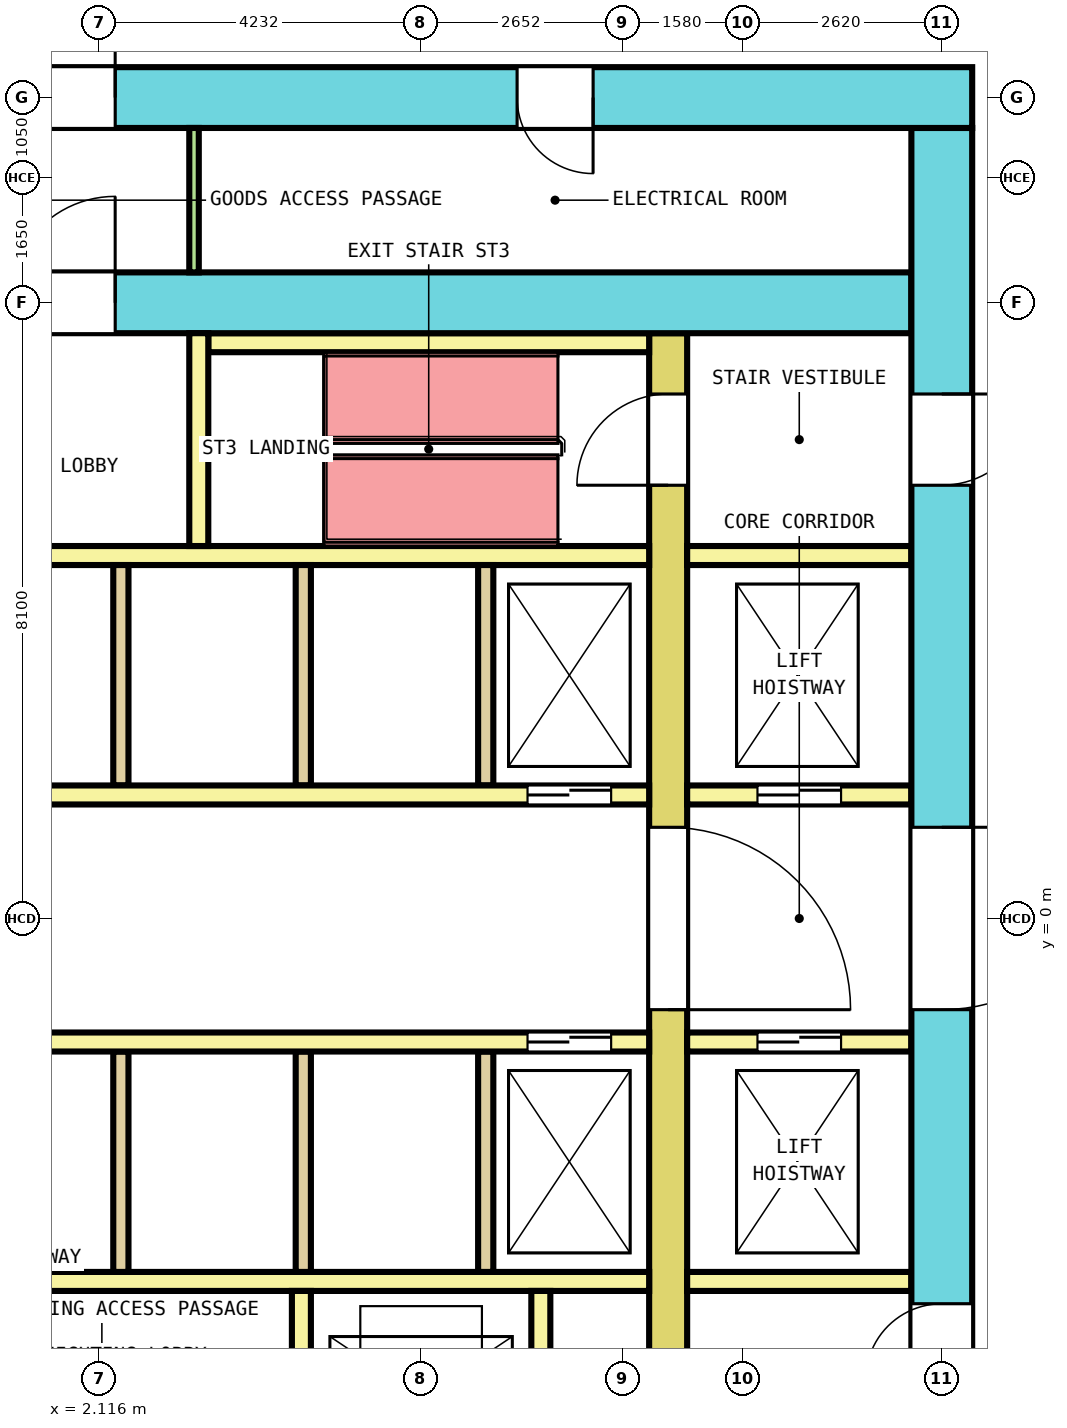
"""IFC4 building model, lengths in metres.
Left out: names, types, materials, properties, quantities, classifications, styles, units other than length and angle.
Written with IfcOpenShell. Run it as: python <this file> out.ifc"""

import sys

from ifc_helpers import new_model, si_unit, direction, frame, frame_2d, origin, place, context, subcontext, project, spatial, rectangle, extrude, element, fill, save


model = new_model("IFC4")
c1 = context("Model", 3, precision=1e-05, world=origin(), true_north=direction((0.0, 1.0)))
c2 = subcontext(c1, "Body", "Model", "MODEL_VIEW")
j1 = project(units=[si_unit("LENGTHUNIT", "METRE"), si_unit("PLANEANGLEUNIT", "RADIAN")], contexts=[c1])
p1 = place(None, origin())
s1 = spatial("IfcSite", under=j1, at=p1, CompositionType="ELEMENT")
p2 = place(p1, origin())
s2 = spatial("IfcBuilding", under=s1, at=p2, CompositionType="ELEMENT")
p3 = place(p2, frame((0.0, 0.0, 89.6)))
s3 = spatial("IfcBuildingStorey", under=s2, at=p3, CompositionType="ELEMENT", Elevation=89.6)
p4 = place(p3, frame((-13.6, 10.8, 0.0), z_axis=(0.0, 0.0, 1.0), x_axis=(1.0, 0.0, 0.0)))
e1 = element("IfcWall", 1, at=p4, inside=s3, PredefinedType="SHEAR", context=c2, shape_type="SweptSolid", body=[
    extrude(rectangle(XDim=27.2, YDim=0.8, at=frame_2d((13.6, 0.0))), origin(), (0.0, 0.0, 1.0), 4.1),
])
p5 = place(p4, frame((1.798, 0.0, 0.0)))
e2 = element("IfcOpeningElement", 2, at=p5, cuts=e1, PredefinedType="OPENING", context=c2, shape_type="SweptSolid", body=[
    extrude(rectangle(XDim=1.0, YDim=2.1, at=frame_2d((0.5, 1.05))), frame((0.0, 0.41, 0.0), z_axis=(0.0, -1.0, 0.0), x_axis=(1.0, 0.0, 0.0)), (0.0, 0.0, 1.0), 0.82),
])
p6 = place(p4, frame((4.889, 0.0, 0.0)))
e3 = element("IfcOpeningElement", 3, at=p6, cuts=e1, PredefinedType="OPENING", context=c2, shape_type="SweptSolid", body=[
    extrude(rectangle(XDim=1.0, YDim=2.1, at=frame_2d((0.5, 1.05))), frame((0.0, 0.41, 0.0), z_axis=(0.0, -1.0, 0.0), x_axis=(1.0, 0.0, 0.0)), (0.0, 0.0, 1.0), 0.82),
])
p7 = place(p4, frame((7.948, 0.0, 0.0)))
e4 = element("IfcOpeningElement", 4, at=p7, cuts=e1, PredefinedType="OPENING", context=c2, shape_type="SweptSolid", body=[
    extrude(rectangle(XDim=1.0, YDim=2.1, at=frame_2d((0.5, 1.05))), frame((0.0, 0.41, 0.0), z_axis=(0.0, -1.0, 0.0), x_axis=(1.0, 0.0, 0.0)), (0.0, 0.0, 1.0), 0.82),
])
p8 = place(p4, frame((11.008, 0.0, 0.0)))
e5 = element("IfcOpeningElement", 5, at=p8, cuts=e1, PredefinedType="OPENING", context=c2, shape_type="SweptSolid", body=[
    extrude(rectangle(XDim=1.0, YDim=2.1, at=frame_2d((0.5, 1.05))), frame((0.0, 0.41, 0.0), z_axis=(0.0, -1.0, 0.0), x_axis=(1.0, 0.0, 0.0)), (0.0, 0.0, 1.0), 0.82),
])
p9 = place(p4, frame((21.212, 0.0, 0.0)))
e6 = element("IfcOpeningElement", 6, at=p9, cuts=e1, PredefinedType="OPENING", context=c2, shape_type="SweptSolid", body=[
    extrude(rectangle(XDim=1.0, YDim=2.1, at=frame_2d((0.5, 1.05))), frame((0.0, 0.41, 0.0), z_axis=(0.0, -1.0, 0.0), x_axis=(1.0, 0.0, 0.0)), (0.0, 0.0, 1.0), 0.82),
])
p10 = place(p4, frame((14.525, 0.0, 0.0)))
e7 = element("IfcOpeningElement", 7, at=p10, cuts=e1, PredefinedType="OPENING", context=c2, shape_type="SweptSolid", body=[
    extrude(rectangle(XDim=1.4, YDim=2.1, at=frame_2d((0.7, 1.05))), frame((0.0, 0.41, 0.0), z_axis=(0.0, -1.0, 0.0), x_axis=(1.0, 0.0, 0.0)), (0.0, 0.0, 1.0), 0.82),
])
p11 = place(p3, frame((13.2, -10.4, 0.0), z_axis=(0.0, 0.0, 1.0), x_axis=(0.0, 1.0, 0.0)))
e8 = element("IfcWall", 8, at=p11, inside=s3, PredefinedType="SHEAR", context=c2, shape_type="SweptSolid", body=[
    extrude(rectangle(XDim=20.8, YDim=0.8, at=frame_2d((10.4, 0.0))), origin(), (0.0, 0.0, 1.0), 4.1),
])
p12 = place(p11, frame((9.2, 0.0, 0.0)))
e9 = element("IfcOpeningElement", 9, at=p12, cuts=e8, PredefinedType="OPENING", context=c2, shape_type="SweptSolid", body=[
    extrude(rectangle(XDim=2.4, YDim=2.1, at=frame_2d((1.2, 1.05))), frame((0.0, 0.41, 0.0), z_axis=(0.0, -1.0, 0.0), x_axis=(1.0, 0.0, 0.0)), (0.0, 0.0, 1.0), 0.82),
])
p13 = place(p11, frame((16.1, 0.0, 0.0)))
e10 = element("IfcOpeningElement", 10, at=p13, cuts=e8, PredefinedType="OPENING", context=c2, shape_type="SweptSolid", body=[
    extrude(rectangle(XDim=1.2, YDim=2.1, at=frame_2d((0.6, 1.05))), frame((0.0, 0.41, 0.0), z_axis=(0.0, -1.0, 0.0), x_axis=(1.0, 0.0, 0.0)), (0.0, 0.0, 1.0), 0.82),
])
p14 = place(p11, frame((2.869, 0.0, 0.0)))
e11 = element("IfcOpeningElement", 11, at=p14, cuts=e8, PredefinedType="OPENING", context=c2, shape_type="SweptSolid", body=[
    extrude(rectangle(XDim=1.0, YDim=2.1, at=frame_2d((0.5, 1.05))), frame((0.0, 0.41, 0.0), z_axis=(0.0, -1.0, 0.0), x_axis=(1.0, 0.0, 0.0)), (0.0, 0.0, 1.0), 0.82),
])
p15 = place(p11, frame((4.331, 0.0, 0.0)))
e12 = element("IfcOpeningElement", 12, at=p15, cuts=e8, PredefinedType="OPENING", context=c2, shape_type="SweptSolid", body=[
    extrude(rectangle(XDim=1.0, YDim=2.1, at=frame_2d((0.5, 1.05))), frame((0.0, 0.41, 0.0), z_axis=(0.0, -1.0, 0.0), x_axis=(1.0, 0.0, 0.0)), (0.0, 0.0, 1.0), 0.82),
])
p16 = place(p3, frame((-12.8, 8.1, 0.0), z_axis=(0.0, 0.0, 1.0), x_axis=(1.0, 0.0, 0.0)))
e13 = element("IfcWall", 13, at=p16, inside=s3, PredefinedType="SHEAR", context=c2, shape_type="SweptSolid", body=[
    extrude(rectangle(XDim=25.6, YDim=0.8, at=frame_2d((12.8, 0.0))), origin(), (0.0, 0.0, 1.0), 4.1),
])
p17 = place(p16, frame((13.725, 0.0, 0.0)))
e14 = element("IfcOpeningElement", 14, at=p17, cuts=e13, PredefinedType="OPENING", context=c2, shape_type="SweptSolid", body=[
    extrude(rectangle(XDim=1.4, YDim=2.1, at=frame_2d((0.7, 1.05))), frame((0.0, 0.41, 0.0), z_axis=(0.0, -1.0, 0.0), x_axis=(1.0, 0.0, 0.0)), (0.0, 0.0, 1.0), 0.82),
])
p18 = place(p3, frame((9.6, -7.7, 0.0), z_axis=(0.0, 0.0, 1.0), x_axis=(0.0, 1.0, 0.0)))
e15 = element("IfcWall", 15, at=p18, inside=s3, PredefinedType="SHEAR", context=c2, shape_type="SweptSolid", body=[
    extrude(rectangle(XDim=15.4, YDim=0.5, at=frame_2d((7.7, 0.0))), origin(), (0.0, 0.0, 1.0), 4.1),
])
p19 = place(p18, frame((6.5, 0.0, 0.0)))
e16 = element("IfcOpeningElement", 16, at=p19, cuts=e15, PredefinedType="OPENING", context=c2, shape_type="SweptSolid", body=[
    extrude(rectangle(XDim=2.4, YDim=2.1, at=frame_2d((1.2, 1.05))), frame((0.0, 0.26, 0.0), z_axis=(0.0, -1.0, 0.0), x_axis=(1.0, 0.0, 0.0)), (0.0, 0.0, 1.0), 0.52),
])
p20 = place(p18, frame((13.4, 0.0, 0.0)))
e17 = element("IfcOpeningElement", 17, at=p20, cuts=e15, PredefinedType="OPENING", context=c2, shape_type="SweptSolid", body=[
    extrude(rectangle(XDim=1.2, YDim=2.1, at=frame_2d((0.6, 1.05))), frame((0.0, 0.26, 0.0), z_axis=(0.0, -1.0, 0.0), x_axis=(1.0, 0.0, 0.0)), (0.0, 0.0, 1.0), 0.52),
])
p21 = place(p18, frame((0.9, 0.0, 0.0)))
e18 = element("IfcOpeningElement", 18, at=p21, cuts=e15, PredefinedType="OPENING", context=c2, shape_type="SweptSolid", body=[
    extrude(rectangle(XDim=1.0, YDim=2.1, at=frame_2d((0.5, 1.05))), frame((0.0, 0.26, 0.0), z_axis=(0.0, -1.0, 0.0), x_axis=(1.0, 0.0, 0.0)), (0.0, 0.0, 1.0), 0.52),
])
p22 = place(p3, frame((-9.35, 1.625, 0.0), z_axis=(0.0, 0.0, 1.0), x_axis=(1.0, 0.0, 0.0)))
e19 = element("IfcWall", 19, at=p22, inside=s3, PredefinedType="SOLIDWALL", context=c2, shape_type="SweptSolid", body=[
    extrude(rectangle(XDim=18.7, YDim=0.25, at=frame_2d((9.35, 0.0))), origin(), (0.0, 0.0, 1.0), 4.1),
])
p23 = place(p22, frame((0.5, 0.0, 0.0)))
e20 = element("IfcOpeningElement", 20, at=p23, cuts=e19, PredefinedType="OPENING", context=c2, shape_type="SweptSolid", body=[
    extrude(rectangle(XDim=1.1, YDim=2.1, at=frame_2d((0.55, 1.05))), frame((0.0, 0.135, 0.0), z_axis=(0.0, -1.0, 0.0), x_axis=(1.0, 0.0, 0.0)), (0.0, 0.0, 1.0), 0.27),
])
p24 = place(p22, frame((17.1, 0.0, 0.0)))
e21 = element("IfcOpeningElement", 21, at=p24, cuts=e19, PredefinedType="OPENING", context=c2, shape_type="SweptSolid", body=[
    extrude(rectangle(XDim=1.1, YDim=2.1, at=frame_2d((0.55, 1.05))), frame((0.0, 0.135, 0.0), z_axis=(0.0, -1.0, 0.0), x_axis=(1.0, 0.0, 0.0)), (0.0, 0.0, 1.0), 0.27),
])
p25 = place(p3, frame((9.85, 1.625, 0.0), z_axis=(0.0, 0.0, 1.0), x_axis=(1.0, 0.0, 0.0)))
e22 = element("IfcWall", 22, at=p25, inside=s3, PredefinedType="SOLIDWALL", context=c2, shape_type="SweptSolid", body=[
    extrude(rectangle(XDim=2.95, YDim=0.25, at=frame_2d((1.475, 0.0))), origin(), (0.0, 0.0, 1.0), 4.1),
])
p26 = place(p25, frame((0.925, 0.0, 0.0)))
e23 = element("IfcOpeningElement", 23, at=p26, cuts=e22, PredefinedType="OPENING", context=c2, shape_type="SweptSolid", body=[
    extrude(rectangle(XDim=1.1, YDim=2.1, at=frame_2d((0.55, 1.05))), frame((0.0, 0.135, 0.0), z_axis=(0.0, -1.0, 0.0), x_axis=(1.0, 0.0, 0.0)), (0.0, 0.0, 1.0), 0.27),
])
p27 = place(p3, frame((-9.35, 4.775, 0.0), z_axis=(0.0, 0.0, 1.0), x_axis=(1.0, 0.0, 0.0)))
e24 = element("IfcWall", 24, at=p27, inside=s3, PredefinedType="SOLIDWALL", context=c2, shape_type="SweptSolid", body=[
    extrude(rectangle(XDim=18.7, YDim=0.25, at=frame_2d((9.35, 0.0))), origin(), (0.0, 0.0, 1.0), 4.1),
])
p28 = place(p3, frame((9.85, 4.775, 0.0), z_axis=(0.0, 0.0, 1.0), x_axis=(1.0, 0.0, 0.0)))
e25 = element("IfcWall", 25, at=p28, inside=s3, PredefinedType="SOLIDWALL", context=c2, shape_type="SweptSolid", body=[
    extrude(rectangle(XDim=2.95, YDim=0.25, at=frame_2d((1.475, 0.0))), origin(), (0.0, 0.0, 1.0), 4.1),
])
for number, where, z_axis, x_axis in (
    (26, (2.4, 1.75, 0.0), (0.0, 0.0, 1.0), (0.0, 1.0, 0.0)),
    (27, (4.8, 1.75, 0.0), (0.0, 0.0, 1.0), (0.0, 1.0, 0.0)),
    (28, (7.2, 1.75, 0.0), (0.0, 0.0, 1.0), (0.0, 1.0, 0.0)),
):
    element("IfcWall", number, at=place(p3, frame(where, z_axis=z_axis, x_axis=x_axis)), inside=s3, PredefinedType="SOLIDWALL", context=c2, shape_type="SweptSolid", body=[
        extrude(rectangle(XDim=2.9, YDim=0.2, at=frame_2d((1.45, 0.0))), origin(), (0.0, 0.0, 1.0), 4.1),
    ])
p29 = place(p3, frame((-9.35, -1.625, 0.0), z_axis=(0.0, 0.0, 1.0), x_axis=(1.0, 0.0, 0.0)))
e29 = element("IfcWall", 29, at=p29, inside=s3, PredefinedType="SOLIDWALL", context=c2, shape_type="SweptSolid", body=[
    extrude(rectangle(XDim=18.7, YDim=0.25, at=frame_2d((9.35, 0.0))), origin(), (0.0, 0.0, 1.0), 4.1),
])
p30 = place(p29, frame((0.5, 0.0, 0.0)))
e30 = element("IfcOpeningElement", 30, at=p30, cuts=e29, PredefinedType="OPENING", context=c2, shape_type="SweptSolid", body=[
    extrude(rectangle(XDim=1.1, YDim=2.1, at=frame_2d((0.55, 1.05))), frame((0.0, 0.135, 0.0), z_axis=(0.0, -1.0, 0.0), x_axis=(1.0, 0.0, 0.0)), (0.0, 0.0, 1.0), 0.27),
])
p31 = place(p29, frame((17.1, 0.0, 0.0)))
e31 = element("IfcOpeningElement", 31, at=p31, cuts=e29, PredefinedType="OPENING", context=c2, shape_type="SweptSolid", body=[
    extrude(rectangle(XDim=1.1, YDim=2.1, at=frame_2d((0.55, 1.05))), frame((0.0, 0.135, 0.0), z_axis=(0.0, -1.0, 0.0), x_axis=(1.0, 0.0, 0.0)), (0.0, 0.0, 1.0), 0.27),
])
p32 = place(p3, frame((9.85, -1.625, 0.0), z_axis=(0.0, 0.0, 1.0), x_axis=(1.0, 0.0, 0.0)))
e32 = element("IfcWall", 32, at=p32, inside=s3, PredefinedType="SOLIDWALL", context=c2, shape_type="SweptSolid", body=[
    extrude(rectangle(XDim=2.95, YDim=0.25, at=frame_2d((1.475, 0.0))), origin(), (0.0, 0.0, 1.0), 4.1),
])
p33 = place(p32, frame((0.925, 0.0, 0.0)))
e33 = element("IfcOpeningElement", 33, at=p33, cuts=e32, PredefinedType="OPENING", context=c2, shape_type="SweptSolid", body=[
    extrude(rectangle(XDim=1.1, YDim=2.1, at=frame_2d((0.55, 1.05))), frame((0.0, 0.135, 0.0), z_axis=(0.0, -1.0, 0.0), x_axis=(1.0, 0.0, 0.0)), (0.0, 0.0, 1.0), 0.27),
])
p34 = place(p3, frame((-9.35, -4.775, 0.0), z_axis=(0.0, 0.0, 1.0), x_axis=(1.0, 0.0, 0.0)))
e34 = element("IfcWall", 34, at=p34, inside=s3, PredefinedType="SOLIDWALL", context=c2, shape_type="SweptSolid", body=[
    extrude(rectangle(XDim=18.7, YDim=0.25, at=frame_2d((9.35, 0.0))), origin(), (0.0, 0.0, 1.0), 4.1),
])
p35 = place(p3, frame((9.85, -4.775, 0.0), z_axis=(0.0, 0.0, 1.0), x_axis=(1.0, 0.0, 0.0)))
e35 = element("IfcWall", 35, at=p35, inside=s3, PredefinedType="SOLIDWALL", context=c2, shape_type="SweptSolid", body=[
    extrude(rectangle(XDim=2.95, YDim=0.25, at=frame_2d((1.475, 0.0))), origin(), (0.0, 0.0, 1.0), 4.1),
])
for number, where, z_axis, x_axis in (
    (36, (2.4, -4.65, 0.0), (0.0, 0.0, 1.0), (0.0, 1.0, 0.0)),
    (37, (4.8, -4.65, 0.0), (0.0, 0.0, 1.0), (0.0, 1.0, 0.0)),
    (38, (7.2, -4.65, 0.0), (0.0, 0.0, 1.0), (0.0, 1.0, 0.0)),
):
    element("IfcWall", number, at=place(p3, frame(where, z_axis=z_axis, x_axis=x_axis)), inside=s3, PredefinedType="SOLIDWALL", context=c2, shape_type="SweptSolid", body=[
        extrude(rectangle(XDim=2.9, YDim=0.2, at=frame_2d((1.45, 0.0))), origin(), (0.0, 0.0, 1.0), 4.1),
    ])
p36 = place(p3, frame((3.55, 7.575, 0.0), z_axis=(0.0, 0.0, 1.0), x_axis=(1.0, 0.0, 0.0)))
e39 = element("IfcWall", 39, at=p36, inside=s3, PredefinedType="SOLIDWALL", context=c2, shape_type="SweptSolid", body=[
    extrude(rectangle(XDim=5.8, YDim=0.25, at=frame_2d((2.9, 0.0))), origin(), (0.0, 0.0, 1.0), 4.1),
])
p37 = place(p3, frame((3.425, 4.9, 0.0), z_axis=(0.0, 0.0, 1.0), x_axis=(0.0, 1.0, 0.0)))
e40 = element("IfcWall", 40, at=p37, inside=s3, PredefinedType="SOLIDWALL", context=c2, shape_type="SweptSolid", body=[
    extrude(rectangle(XDim=2.8, YDim=0.25, at=frame_2d((1.4, 0.0))), origin(), (0.0, 0.0, 1.0), 4.1),
])
p38 = place(p3, frame((4.775, -7.7, 0.0), z_axis=(0.0, 0.0, 1.0), x_axis=(0.0, 1.0, 0.0)))
e41 = element("IfcWall", 41, at=p38, inside=s3, PredefinedType="SOLIDWALL", context=c2, shape_type="SweptSolid", body=[
    extrude(rectangle(XDim=2.8, YDim=0.25, at=frame_2d((1.4, 0.0))), origin(), (0.0, 0.0, 1.0), 4.1),
])
p39 = place(p38, frame((0.85, 0.0, 0.0)))
e42 = element("IfcOpeningElement", 42, at=p39, cuts=e41, PredefinedType="OPENING", context=c2, shape_type="SweptSolid", body=[
    extrude(rectangle(XDim=1.1, YDim=2.1, at=frame_2d((0.55, 1.05))), frame((0.0, 0.135, 0.0), z_axis=(0.0, -1.0, 0.0), x_axis=(1.0, 0.0, 0.0)), (0.0, 0.0, 1.0), 0.27),
])
p40 = place(p3, frame((7.925, -7.7, 0.0), z_axis=(0.0, 0.0, 1.0), x_axis=(0.0, 1.0, 0.0)))
e43 = element("IfcWall", 43, at=p40, inside=s3, PredefinedType="SOLIDWALL", context=c2, shape_type="SweptSolid", body=[
    extrude(rectangle(XDim=2.8, YDim=0.25, at=frame_2d((1.4, 0.0))), origin(), (0.0, 0.0, 1.0), 4.1),
])
p41 = place(p3, frame((3.363, 8.5, 0.0), z_axis=(0.0, 0.0, 1.0), x_axis=(0.0, 1.0, 0.0)))
e44 = element("IfcWall", 44, at=p41, inside=s3, PredefinedType="PARTITIONING", context=c2, shape_type="SweptSolid", body=[
    extrude(rectangle(XDim=1.9, YDim=0.125, at=frame_2d((0.95, 0.0))), origin(), (0.0, 0.0, 1.0), 4.1),
])
p42 = place(p24, origin())
e45 = element("IfcDoor", 45, at=p42, inside=s3, OperationType="DOUBLE_DOOR_SLIDING", PredefinedType="DOOR", context=c2, shape_type="SweptSolid", body=[
    extrude(rectangle(XDim=1.1, YDim=2.1, at=frame_2d((0.55, 1.05))), frame((0.0, 0.075, 0.0), z_axis=(0.0, -1.0, 0.0), x_axis=(1.0, 0.0, 0.0)), (0.0, 0.0, 1.0), 0.15),
])
fill(e21, e45)
p43 = place(p26, origin())
e46 = element("IfcDoor", 46, at=p43, inside=s3, OperationType="DOUBLE_DOOR_SLIDING", PredefinedType="DOOR", context=c2, shape_type="SweptSolid", body=[
    extrude(rectangle(XDim=1.1, YDim=2.1, at=frame_2d((0.55, 1.05))), frame((0.0, 0.075, 0.0), z_axis=(0.0, -1.0, 0.0), x_axis=(1.0, 0.0, 0.0)), (0.0, 0.0, 1.0), 0.15),
])
fill(e23, e46)
p44 = place(p31, origin())
e47 = element("IfcDoor", 47, at=p44, inside=s3, OperationType="DOUBLE_DOOR_SLIDING", PredefinedType="DOOR", context=c2, shape_type="SweptSolid", body=[
    extrude(rectangle(XDim=1.1, YDim=2.1, at=frame_2d((0.55, 1.05))), frame((0.0, 0.075, 0.0), z_axis=(0.0, -1.0, 0.0), x_axis=(1.0, 0.0, 0.0)), (0.0, 0.0, 1.0), 0.15),
])
fill(e31, e47)
p45 = place(p33, origin())
e48 = element("IfcDoor", 48, at=p45, inside=s3, OperationType="DOUBLE_DOOR_SLIDING", PredefinedType="DOOR", context=c2, shape_type="SweptSolid", body=[
    extrude(rectangle(XDim=1.1, YDim=2.1, at=frame_2d((0.55, 1.05))), frame((0.0, 0.075, 0.0), z_axis=(0.0, -1.0, 0.0), x_axis=(1.0, 0.0, 0.0)), (0.0, 0.0, 1.0), 0.15),
])
fill(e33, e48)
p46 = place(p19, origin())
e49 = element("IfcDoor", 49, at=p46, inside=s3, OperationType="DOUBLE_DOOR_SINGLE_SWING", PredefinedType="DOOR", context=c2, shape_type="SweptSolid", body=[
    extrude(rectangle(XDim=2.4, YDim=2.1, at=frame_2d((1.2, 1.05))), frame((0.0, 0.2, 0.0), z_axis=(0.0, -1.0, 0.0), x_axis=(1.0, 0.0, 0.0)), (0.0, 0.0, 1.0), 0.4),
])
fill(e16, e49)
p47 = place(p12, origin())
e50 = element("IfcDoor", 50, at=p47, inside=s3, OperationType="DOUBLE_DOOR_SINGLE_SWING", PredefinedType="DOOR", context=c2, shape_type="SweptSolid", body=[
    extrude(rectangle(XDim=2.4, YDim=2.1, at=frame_2d((1.2, 1.05))), frame((0.0, 0.3, 0.0), z_axis=(0.0, -1.0, 0.0), x_axis=(1.0, 0.0, 0.0)), (0.0, 0.0, 1.0), 0.6),
])
fill(e9, e50)
p48 = place(p20, origin())
e51 = element("IfcDoor", 51, at=p48, inside=s3, OperationType="SINGLE_SWING_LEFT", PredefinedType="DOOR", context=c2, shape_type="SweptSolid", body=[
    extrude(rectangle(XDim=1.2, YDim=2.1, at=frame_2d((0.6, 1.05))), frame((0.0, 0.2, 0.0), z_axis=(0.0, -1.0, 0.0), x_axis=(1.0, 0.0, 0.0)), (0.0, 0.0, 1.0), 0.4),
])
fill(e17, e51)
p49 = place(p13, origin())
e52 = element("IfcDoor", 52, at=p49, inside=s3, OperationType="SINGLE_SWING_RIGHT", PredefinedType="DOOR", context=c2, shape_type="SweptSolid", body=[
    extrude(rectangle(XDim=1.2, YDim=2.1, at=frame_2d((0.6, 1.05))), frame((0.0, 0.3, 0.0), z_axis=(0.0, -1.0, 0.0), x_axis=(1.0, 0.0, 0.0)), (0.0, 0.0, 1.0), 0.6),
])
fill(e10, e52)
p50 = place(p17, origin())
e53 = element("IfcDoor", 53, at=p50, inside=s3, OperationType="DOUBLE_DOOR_SINGLE_SWING", PredefinedType="DOOR", context=c2, shape_type="SweptSolid", body=[
    extrude(rectangle(XDim=1.4, YDim=2.1, at=frame_2d((0.7, 1.05))), frame((0.0, 0.3, 0.0), z_axis=(0.0, -1.0, 0.0), x_axis=(1.0, 0.0, 0.0)), (0.0, 0.0, 1.0), 0.6),
])
fill(e14, e53)
p51 = place(p15, origin())
e54 = element("IfcDoor", 54, at=p51, inside=s3, OperationType="SINGLE_SWING_LEFT", PredefinedType="DOOR", context=c2, shape_type="SweptSolid", body=[
    extrude(rectangle(XDim=1.0, YDim=2.1, at=frame_2d((0.5, 1.05))), frame((0.0, 0.3, 0.0), z_axis=(0.0, -1.0, 0.0), x_axis=(1.0, 0.0, 0.0)), (0.0, 0.0, 1.0), 0.6),
])
fill(e12, e54)
p52 = place(p9, origin())
e55 = element("IfcDoor", 55, at=p52, inside=s3, OperationType="SINGLE_SWING_RIGHT", PredefinedType="DOOR", context=c2, shape_type="SweptSolid", body=[
    extrude(rectangle(XDim=1.0, YDim=2.1, at=frame_2d((0.5, 1.05))), frame((0.0, 0.3, 0.0), z_axis=(0.0, -1.0, 0.0), x_axis=(1.0, 0.0, 0.0)), (0.0, 0.0, 1.0), 0.6),
])
fill(e6, e55)
p53 = place(p10, origin())
e56 = element("IfcDoor", 56, at=p53, inside=s3, OperationType="DOUBLE_DOOR_SINGLE_SWING", PredefinedType="DOOR", context=c2, shape_type="SweptSolid", body=[
    extrude(rectangle(XDim=1.4, YDim=2.1, at=frame_2d((0.7, 1.05))), frame((0.0, 0.3, 0.0), z_axis=(0.0, -1.0, 0.0), x_axis=(1.0, 0.0, 0.0)), (0.0, 0.0, 1.0), 0.6),
])
fill(e7, e56)
save(model, sys.argv[1])
